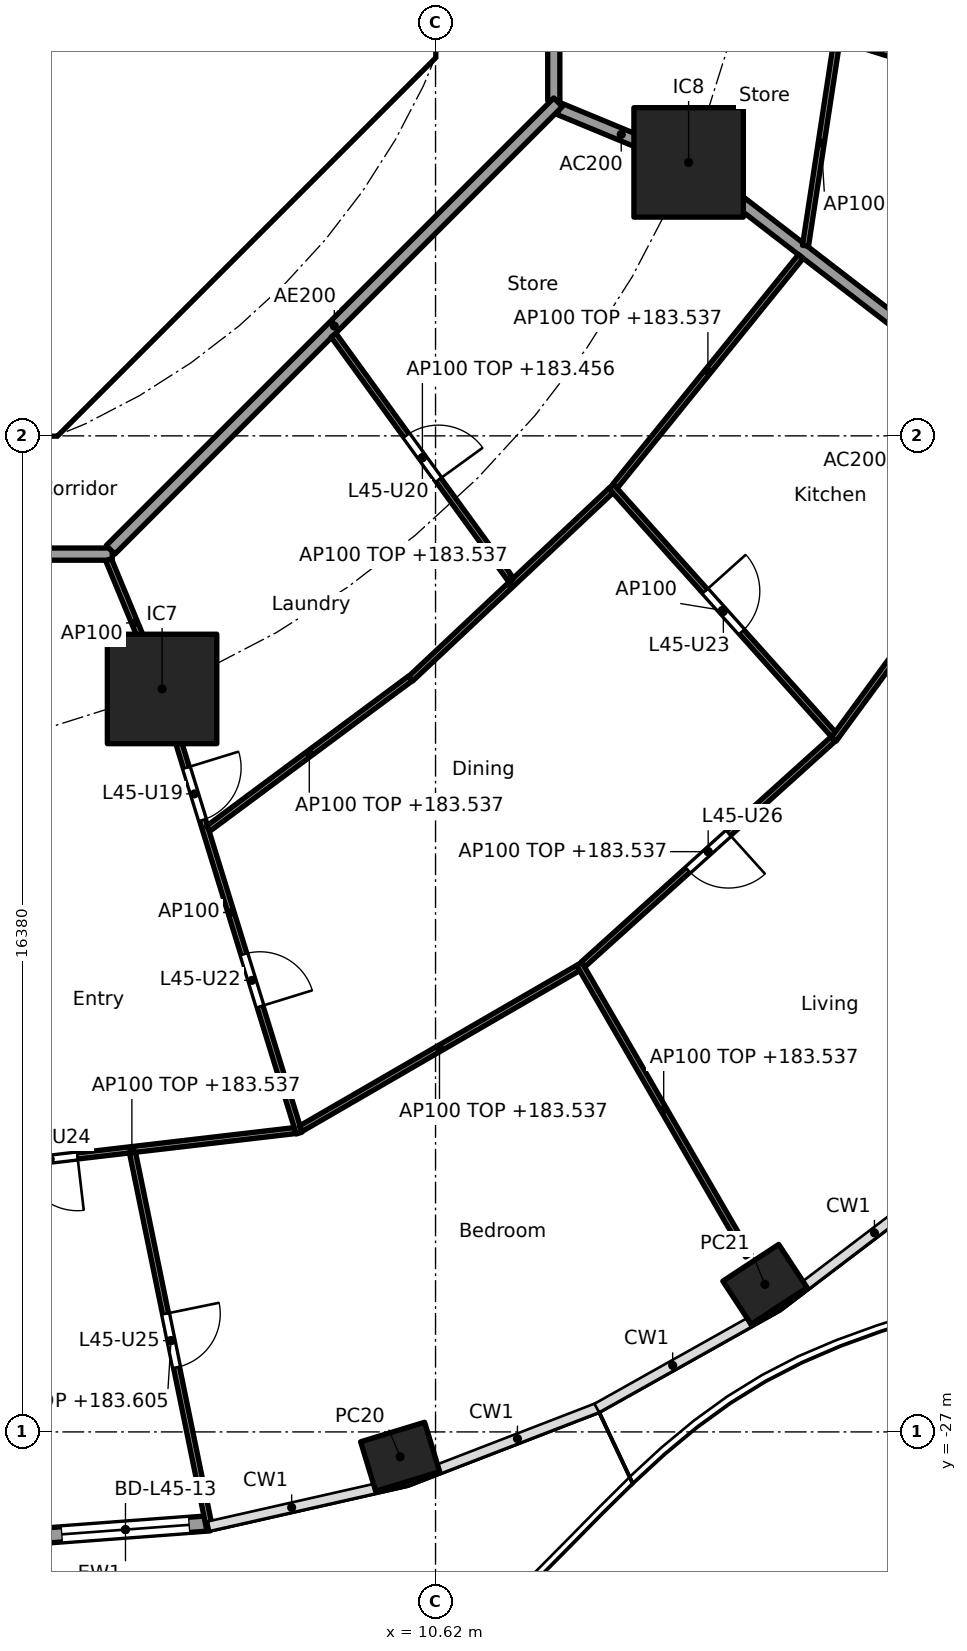
"""IFC4 building model, lengths in metres.
Left out: names, types, materials, properties, quantities, classifications, styles, units other than length and angle.
Written with IfcOpenShell. Run it as: python <this file> out.ifc"""

import sys

from ifc_helpers import new_model, si_unit, direction, frame, frame_2d, origin, origin_2d, place, context, subcontext, project, spatial, polyline, rectangle, hollow_rectangle, outline, extrude, element, fill, save


model = new_model("IFC4")
c1 = context("Model", 3, precision=1e-05, world=origin(), true_north=direction((0.0, 1.0)))
c2 = subcontext(c1, "Body", "Model", "MODEL_VIEW")
j1 = project(units=[si_unit("LENGTHUNIT", "METRE"), si_unit("PLANEANGLEUNIT", "RADIAN")], contexts=[c1])
p1 = place(None, origin())
s1 = spatial("IfcSite", under=j1, at=p1, CompositionType="ELEMENT")
p2 = place(p1, origin())
s2 = spatial("IfcBuilding", under=s1, at=p2, CompositionType="ELEMENT")
p3 = place(p2, frame((0.0, 0.0, 180.7)))
s3 = spatial("IfcBuildingStorey", under=s2, at=p3, CompositionType="ELEMENT", Elevation=180.7)
for number, where, z_axis, x_axis in (
    (1, (10.038, -27.408, 0.0), (0.0, 0.0, 1.0), (0.957, 0.292, 0.0)),
    (2, (16.038, -24.573, 0.0), (0.0, 0.0, 1.0), (0.836, 0.549, 0.0)),
):
    element("IfcColumn", number, at=place(p3, frame(where, z_axis=z_axis, x_axis=x_axis)), inside=s3, PredefinedType="COLUMN", context=c2, shape_type="SweptSolid", body=[
        extrude(hollow_rectangle(XDim=1.1, YDim=0.85, WallThickness=0.036, at=origin_2d()), origin(), (0.0, 0.0, 1.0), 3.7),
    ])
for number, where, z_axis, x_axis in (
    (3, (6.123, -14.782, 0.0), (0.0, 0.0, 1.0), (1.0, 0.0, 0.0)),
    (4, (14.782, -6.123, 0.0), (0.0, 0.0, 1.0), (1.0, 0.0, 0.0)),
):
    element("IfcColumn", number, at=place(p3, frame(where, z_axis=z_axis, x_axis=x_axis)), inside=s3, PredefinedType="COLUMN", context=c2, shape_type="SweptSolid", body=[
        extrude(rectangle(XDim=1.8, YDim=1.8, at=origin_2d()), origin(), (0.0, 0.0, 1.0), 3.7),
    ])
p4 = place(p3, frame((6.903, -28.503, 0.0), z_axis=(0.0, 0.0, 1.0), x_axis=(-0.997232064422, -0.074351931305, 0.0)))
e5 = element("IfcWall", 5, at=p4, inside=s3, PredefinedType="SOLIDWALL", context=c2, shape_type="SweptSolid", body=[
    extrude(rectangle(XDim=2.771, YDim=0.25, at=frame_2d((1.386, 0.0))), origin(), (0.0, 0.0, 1.0), 3.44),
])
p5 = place(p4, frame((0.336, 0.0, 0.0)))
e6 = element("IfcOpeningElement", 6, at=p5, cuts=e5, PredefinedType="OPENING", context=c2, shape_type="SweptSolid", body=[
    extrude(rectangle(XDim=2.1, YDim=2.4, at=frame_2d((1.05, 1.2))), frame((0.0, 0.135, 0.0), z_axis=(0.0, -1.0, 0.0), x_axis=(1.0, 0.0, 0.0)), (0.0, 0.0, 1.0), 0.27),
])
p6 = place(p3, frame((4.613, -9.988, 0.0), z_axis=(0.0, 0.0, 1.0), x_axis=(0.707106781187, 0.707106781187, 0.0)))
e7 = element("IfcWall", 7, at=p6, inside=s3, PredefinedType="SHEAR", context=c2, shape_type="SweptSolid", body=[
    extrude(rectangle(XDim=7.602, YDim=0.6, at=frame_2d((3.801, 0.0))), origin(), (0.0, 0.0, 1.0), 3.44),
])
p7 = place(p6, frame((3.201, 0.0, 0.0)))
e8 = element("IfcOpeningElement", 8, at=p7, cuts=e7, PredefinedType="OPENING", context=c2, shape_type="SweptSolid", body=[
    extrude(rectangle(XDim=1.2, YDim=2.1, at=frame_2d((0.6, 1.05))), frame((0.0, 0.31, 0.0), z_axis=(0.0, -1.0, 0.0), x_axis=(1.0, 0.0, 0.0)), (0.0, 0.0, 1.0), 0.62),
])
p8 = place(p3, origin())
e9 = element("IfcWall", 9, at=p8, inside=s3, PredefinedType="SHEAR", context=c2, shape_type="SweptSolid", body=[
    extrude(outline(polyline([(-4.152, -10.025), (4.152, -10.025), (4.401, -9.776), (4.825, -10.2), (4.401, -10.625), (-4.401, -10.625), (-4.825, -10.2), (-4.401, -9.776), (-4.152, -10.025)])), origin(), (0.0, 0.0, 1.0), 3.44),
])
p9 = place(p3, origin())
e10 = element("IfcWall", 10, at=p9, inside=s3, PredefinedType="SHEAR", context=c2, shape_type="SweptSolid", body=[
    extrude(outline(polyline([(9.776, -4.401), (10.025, -4.152), (10.025, -3.801), (10.025, 4.152), (9.776, 4.401), (10.2, 4.825), (10.625, 4.401), (10.625, -4.401), (10.2, -4.825), (9.776, -4.401)])), origin(), (0.0, 0.0, 1.0), 3.44),
])
p10 = place(p3, frame((12.657, -5.243, 0.0), z_axis=(0.0, 0.0, 1.0), x_axis=(0.92383017907, -0.382802560388, 0.0)))
e11 = element("IfcWall", 11, at=p10, inside=s3, PredefinedType="PARTITIONING", context=c2, shape_type="SweptSolid", body=[
    extrude(rectangle(XDim=2.2, YDim=0.2, at=frame_2d((1.1, 0.0))), origin(), (0.0, 0.0, 1.0), 3.44),
])
p11 = place(p3, frame((14.822, -6.154, 0.0), z_axis=(0.0, 0.0, 1.0), x_axis=(0.792203056092, -0.610257583254, 0.0)))
e12 = element("IfcWall", 12, at=p11, inside=s3, PredefinedType="PARTITIONING", context=c2, shape_type="SweptSolid", body=[
    extrude(rectangle(XDim=12.533, YDim=0.2, at=frame_2d((6.266, 0.0))), origin(), (0.0, 0.0, 1.0), 2.837),
])
p12 = place(p3, frame((12.565, -5.104, 0.0), z_axis=(0.0, 0.0, 1.0), x_axis=(0.0, 1.0, 0.0)))
e13 = element("IfcWall", 13, at=p12, inside=s3, PredefinedType="PARTITIONING", context=c2, shape_type="SweptSolid", body=[
    extrude(rectangle(XDim=10.209, YDim=0.2, at=frame_2d((5.104, 0.0))), origin(), (0.0, 0.0, 1.0), 3.44),
])
p13 = place(p12, frame((3.303, 0.0, 0.0)))
e14 = element("IfcOpeningElement", 14, at=p13, cuts=e13, PredefinedType="OPENING", context=c2, shape_type="SweptSolid", body=[
    extrude(rectangle(XDim=1.0, YDim=2.1, at=frame_2d((0.5, 1.05))), frame((0.0, 0.11, 0.0), z_axis=(0.0, -1.0, 0.0), x_axis=(1.0, 0.0, 0.0)), (0.0, 0.0, 1.0), 0.22),
])
p14 = place(p3, frame((-5.104, -12.565, 0.0), z_axis=(0.0, 0.0, 1.0), x_axis=(1.0, 0.0, 0.0)))
e15 = element("IfcWall", 15, at=p14, inside=s3, PredefinedType="PARTITIONING", context=c2, shape_type="SweptSolid", body=[
    extrude(rectangle(XDim=10.409, YDim=0.2, at=frame_2d((5.205, 0.0))), origin(), (0.0, 0.0, 1.0), 3.44),
])
p15 = place(p14, frame((8.074, 0.0, 0.0)))
e16 = element("IfcOpeningElement", 16, at=p15, cuts=e15, PredefinedType="OPENING", context=c2, shape_type="SweptSolid", body=[
    extrude(rectangle(XDim=1.0, YDim=2.1, at=frame_2d((0.5, 1.05))), frame((0.0, 0.11, 0.0), z_axis=(0.0, -1.0, 0.0), x_axis=(1.0, 0.0, 0.0)), (0.0, 0.0, 1.0), 0.22),
])
p16 = place(p3, frame((5.275, -12.494, 0.0), z_axis=(0.0, 0.0, 1.0), x_axis=(0.707106781187, 0.707106781187, 0.0)))
e17 = element("IfcWall", 17, at=p16, inside=s3, PredefinedType="PARTITIONING", context=c2, shape_type="SweptSolid", body=[
    extrude(rectangle(XDim=10.409, YDim=0.2, at=frame_2d((5.205, 0.0))), origin(), (0.0, 0.0, 1.0), 3.44),
])
p17 = place(p3, frame((2.941, -22.671, 0.0), z_axis=(0.0, 0.0, 1.0), x_axis=(0.993245806382, 0.1160291692, 0.0)))
e18 = element("IfcWall", 18, at=p17, inside=s3, PredefinedType="PARTITIONING", context=c2, shape_type="SweptSolid", body=[
    extrude(rectangle(XDim=5.408, YDim=0.1, at=frame_2d((2.704, 0.0))), origin(), (0.0, 0.0, 1.0), 2.837),
])
p18 = place(p17, frame((0.902, 0.0, 0.0)))
e19 = element("IfcOpeningElement", 19, at=p18, cuts=e18, PredefinedType="OPENING", context=c2, shape_type="SweptSolid", body=[
    extrude(rectangle(XDim=0.9, YDim=2.1, at=frame_2d((0.45, 1.05))), frame((0.0, 0.06, 0.0), z_axis=(0.0, -1.0, 0.0), x_axis=(1.0, 0.0, 0.0)), (0.0, 0.0, 1.0), 0.12),
])
p19 = place(p3, frame((5.636, -22.407, 0.0), z_axis=(0.0, 0.0, 1.0), x_axis=(0.200860375092, -0.979619880218, 0.0)))
e20 = element("IfcWall", 20, at=p19, inside=s3, PredefinedType="PARTITIONING", context=c2, shape_type="SweptSolid", body=[
    extrude(rectangle(XDim=6.311, YDim=0.1, at=frame_2d((3.155, 0.0))), origin(), (0.0, 0.0, 1.0), 2.905),
])
p20 = place(p19, frame((2.705, 0.0, 0.0)))
e21 = element("IfcOpeningElement", 21, at=p20, cuts=e20, PredefinedType="OPENING", context=c2, shape_type="SweptSolid", body=[
    extrude(rectangle(XDim=0.9, YDim=2.1, at=frame_2d((0.45, 1.05))), frame((0.0, 0.06, 0.0), z_axis=(0.0, -1.0, 0.0), x_axis=(1.0, 0.0, 0.0)), (0.0, 0.0, 1.0), 0.12),
])
p21 = place(p3, frame((5.243, -12.657, 0.0), z_axis=(0.0, 0.0, 1.0), x_axis=(0.382719158442, -0.923864733477, 0.0)))
e22 = element("IfcWall", 22, at=p21, inside=s3, PredefinedType="PARTITIONING", context=c2, shape_type="SweptSolid", body=[
    extrude(rectangle(XDim=2.25, YDim=0.1, at=frame_2d((1.125, 0.0))), origin(), (0.0, 0.0, 1.0), 3.44),
])
p22 = place(p3, frame((6.138, -14.83, 0.0), z_axis=(0.0, 0.0, 1.0), x_axis=(0.294822274121, -0.955552105687, 0.0)))
e23 = element("IfcWall", 23, at=p22, inside=s3, PredefinedType="PARTITIONING", context=c2, shape_type="SweptSolid", body=[
    extrude(rectangle(XDim=7.594, YDim=0.1, at=frame_2d((3.797, 0.0))), origin(), (0.0, 0.0, 1.0), 3.44),
])
p23 = place(p22, frame((1.306, 0.0, 0.0)))
e24 = element("IfcOpeningElement", 24, at=p23, cuts=e23, PredefinedType="OPENING", context=c2, shape_type="SweptSolid", body=[
    extrude(rectangle(XDim=0.9, YDim=2.1, at=frame_2d((0.45, 1.05))), frame((0.0, 0.06, 0.0), z_axis=(0.0, -1.0, 0.0), x_axis=(1.0, 0.0, 0.0)), (0.0, 0.0, 1.0), 0.12),
])
p24 = place(p22, frame((4.515, 0.0, 0.0)))
e25 = element("IfcOpeningElement", 25, at=p24, cuts=e23, PredefinedType="OPENING", context=c2, shape_type="SweptSolid", body=[
    extrude(rectangle(XDim=0.9, YDim=2.1, at=frame_2d((0.45, 1.05))), frame((0.0, 0.06, 0.0), z_axis=(0.0, -1.0, 0.0), x_axis=(1.0, 0.0, 0.0)), (0.0, 0.0, 1.0), 0.12),
])
p25 = place(p3, frame((6.881, -17.08, 0.0), z_axis=(0.0, 0.0, 1.0), x_axis=(0.802784956441, 0.596268659005, 0.0)))
e26 = element("IfcWall", 26, at=p25, inside=s3, PredefinedType="PARTITIONING", context=c2, shape_type="SweptSolid", body=[
    extrude(rectangle(XDim=4.142, YDim=0.1, at=frame_2d((2.071, 0.0))), origin(), (0.0, 0.0, 1.0), 2.837),
])
p26 = place(p3, frame((8.405, -22.013, 0.0), z_axis=(0.0, 0.0, 1.0), x_axis=(0.865277177388, 0.501293732547, 0.0)))
e27 = element("IfcWall", 27, at=p26, inside=s3, PredefinedType="PARTITIONING", context=c2, shape_type="SweptSolid", body=[
    extrude(rectangle(XDim=5.27, YDim=0.1, at=frame_2d((2.635, 0.0))), origin(), (0.0, 0.0, 1.0), 2.837),
])
p27 = place(p3, frame((10.21, -14.614, 0.0), z_axis=(0.0, 0.0, 1.0), x_axis=(0.728883199496, 0.684638066055, 0.0)))
e28 = element("IfcWall", 28, at=p27, inside=s3, PredefinedType="PARTITIONING", context=c2, shape_type="SweptSolid", body=[
    extrude(rectangle(XDim=4.519, YDim=0.1, at=frame_2d((2.26, 0.0))), origin(), (0.0, 0.0, 1.0), 2.837),
])
p28 = place(p3, frame((12.983, -19.303, 0.0), z_axis=(0.0, 0.0, 1.0), x_axis=(0.501315846071, -0.865264365659, 0.0)))
e29 = element("IfcWall", 29, at=p28, inside=s3, PredefinedType="PARTITIONING", context=c2, shape_type="SweptSolid", body=[
    extrude(rectangle(XDim=5.542, YDim=0.1, at=frame_2d((2.771, 0.0))), origin(), (0.0, 0.0, 1.0), 2.837),
])
p29 = place(p3, frame((13.045, -19.313, 0.0), z_axis=(0.0, 0.0, 1.0), x_axis=(0.742790086539, 0.66952437397, 0.0)))
e30 = element("IfcWall", 30, at=p29, inside=s3, PredefinedType="PARTITIONING", context=c2, shape_type="SweptSolid", body=[
    extrude(rectangle(XDim=5.542, YDim=0.1, at=frame_2d((2.771, 0.0))), origin(), (0.0, 0.0, 1.0), 2.837),
])
p30 = place(p29, frame((2.321, 0.0, 0.0)))
e31 = element("IfcOpeningElement", 31, at=p30, cuts=e30, PredefinedType="OPENING", context=c2, shape_type="SweptSolid", body=[
    extrude(rectangle(XDim=0.9, YDim=2.1, at=frame_2d((0.45, 1.05))), frame((0.0, 0.06, 0.0), z_axis=(0.0, -1.0, 0.0), x_axis=(1.0, 0.0, 0.0)), (0.0, 0.0, 1.0), 0.12),
])
p31 = place(p3, frame((8.943, -8.966, 0.0), z_axis=(0.0, 0.0, 1.0), x_axis=(0.587187896734, -0.809450661825, 0.0)))
e32 = element("IfcWall", 32, at=p31, inside=s3, PredefinedType="PARTITIONING", context=c2, shape_type="SweptSolid", body=[
    extrude(rectangle(XDim=4.975, YDim=0.1, at=frame_2d((2.487, 0.0))), origin(), (0.0, 0.0, 1.0), 2.756),
])
p32 = place(p31, frame((2.037, 0.0, 0.0)))
e33 = element("IfcOpeningElement", 33, at=p32, cuts=e32, PredefinedType="OPENING", context=c2, shape_type="SweptSolid", body=[
    extrude(rectangle(XDim=0.9, YDim=2.1, at=frame_2d((0.45, 1.05))), frame((0.0, 0.06, 0.0), z_axis=(0.0, -1.0, 0.0), x_axis=(1.0, 0.0, 0.0)), (0.0, 0.0, 1.0), 0.12),
])
p33 = place(p3, frame((13.507, -11.449, 0.0), z_axis=(0.0, 0.0, 1.0), x_axis=(0.667299792168, -0.744789223453, 0.0)))
e34 = element("IfcWall", 34, at=p33, inside=s3, PredefinedType="PARTITIONING", context=c2, shape_type="SweptSolid", body=[
    extrude(rectangle(XDim=5.482, YDim=0.1, at=frame_2d((2.741, 0.0))), origin(), (0.0, 0.0, 1.0), 3.44),
])
p34 = place(p33, frame((2.316, 0.0, 0.0)))
e35 = element("IfcOpeningElement", 35, at=p34, cuts=e34, PredefinedType="OPENING", context=c2, shape_type="SweptSolid", body=[
    extrude(rectangle(XDim=0.9, YDim=2.1, at=frame_2d((0.45, 1.05))), frame((0.0, 0.06, 0.0), z_axis=(0.0, -1.0, 0.0), x_axis=(1.0, 0.0, 0.0)), (0.0, 0.0, 1.0), 0.12),
])
p35 = place(p3, frame((13.572, -11.447, 0.0), z_axis=(0.0, 0.0, 1.0), x_axis=(0.628738316533, 0.777616955399, 0.0)))
e36 = element("IfcWall", 36, at=p35, inside=s3, PredefinedType="PARTITIONING", context=c2, shape_type="SweptSolid", body=[
    extrude(rectangle(XDim=4.857, YDim=0.1, at=frame_2d((2.429, 0.0))), origin(), (0.0, 0.0, 1.0), 2.837),
])
p36 = place(p3, frame((17.169, -15.609, 0.0), z_axis=(0.0, 0.0, 1.0), x_axis=(0.591122127251, 0.806582066918, 0.0)))
e37 = element("IfcWall", 37, at=p36, inside=s3, PredefinedType="PARTITIONING", context=c2, shape_type="SweptSolid", body=[
    extrude(rectangle(XDim=5.96, YDim=0.1, at=frame_2d((2.98, 0.0))), origin(), (0.0, 0.0, 1.0), 2.837),
])
p37 = place(p3, frame((16.704, -7.493, 0.0), z_axis=(0.0, 0.0, 1.0), x_axis=(0.1510806336, 0.988521442434, 0.0)))
e38 = element("IfcWall", 38, at=p37, inside=s3, PredefinedType="PARTITIONING", context=c2, shape_type="SweptSolid", body=[
    extrude(rectangle(XDim=3.419, YDim=0.1, at=frame_2d((1.71, 0.0))), origin(), (0.0, 0.0, 1.0), 2.837),
])
p38 = place(p3, frame((12.66, -2.632, 0.0), z_axis=(0.0, 0.0, 1.0), x_axis=(0.954248738607, -0.299013954302, 0.0)))
e39 = element("IfcWall", 39, at=p38, inside=s3, PredefinedType="PARTITIONING", context=c2, shape_type="SweptSolid", body=[
    extrude(rectangle(XDim=15.142, YDim=0.1, at=frame_2d((7.571, 0.0))), origin(), (0.0, 0.0, 1.0), 2.756),
])
p39 = place(p38, frame((0.669, 0.0, 0.0)))
e40 = element("IfcOpeningElement", 40, at=p39, cuts=e39, PredefinedType="OPENING", context=c2, shape_type="SweptSolid", body=[
    extrude(rectangle(XDim=0.9, YDim=2.1, at=frame_2d((0.45, 1.05))), frame((0.0, 0.06, 0.0), z_axis=(0.0, -1.0, 0.0), x_axis=(1.0, 0.0, 0.0)), (0.0, 0.0, 1.0), 0.12),
])
p40 = place(p38, frame((6.944, 0.0, 0.0)))
e41 = element("IfcOpeningElement", 41, at=p40, cuts=e39, PredefinedType="OPENING", context=c2, shape_type="SweptSolid", body=[
    extrude(rectangle(XDim=0.9, YDim=2.1, at=frame_2d((0.45, 1.05))), frame((0.0, 0.06, 0.0), z_axis=(0.0, -1.0, 0.0), x_axis=(1.0, 0.0, 0.0)), (0.0, 0.0, 1.0), 0.12),
])
p41 = place(p5, origin())
e42 = element("IfcDoor", 42, at=p41, inside=s3, OperationType="SLIDING_TO_LEFT", PredefinedType="DOOR", context=c2, shape_type="SweptSolid", body=[
    extrude(rectangle(XDim=2.1, YDim=2.4, at=frame_2d((1.05, 1.2))), frame((0.0, 0.025, 0.0), z_axis=(0.0, -1.0, 0.0), x_axis=(1.0, 0.0, 0.0)), (0.0, 0.0, 1.0), 0.05),
])
fill(e6, e42)
p42 = place(p7, origin())
e43 = element("IfcDoor", 43, at=p42, inside=s3, OperationType="SINGLE_SWING_LEFT", PredefinedType="DOOR", context=c2, shape_type="SweptSolid", body=[
    extrude(rectangle(XDim=1.2, YDim=2.1, at=frame_2d((0.6, 1.05))), frame((0.0, 0.025, 0.0), z_axis=(0.0, -1.0, 0.0), x_axis=(1.0, 0.0, 0.0)), (0.0, 0.0, 1.0), 0.05),
])
fill(e8, e43)
p43 = place(p23, origin())
e44 = element("IfcDoor", 44, at=p43, inside=s3, OperationType="SINGLE_SWING_LEFT", PredefinedType="DOOR", context=c2, shape_type="SweptSolid", body=[
    extrude(rectangle(XDim=0.9, YDim=2.1, at=frame_2d((0.45, 1.05))), frame((0.0, 0.025, 0.0), z_axis=(0.0, -1.0, 0.0), x_axis=(1.0, 0.0, 0.0)), (0.0, 0.0, 1.0), 0.05),
])
fill(e24, e44)
p44 = place(p32, origin())
e45 = element("IfcDoor", 45, at=p44, inside=s3, OperationType="SINGLE_SWING_RIGHT", PredefinedType="DOOR", context=c2, shape_type="SweptSolid", body=[
    extrude(rectangle(XDim=0.9, YDim=2.1, at=frame_2d((0.45, 1.05))), frame((0.0, 0.025, 0.0), z_axis=(0.0, -1.0, 0.0), x_axis=(1.0, 0.0, 0.0)), (0.0, 0.0, 1.0), 0.05),
])
fill(e33, e45)
p45 = place(p24, origin())
e46 = element("IfcDoor", 46, at=p45, inside=s3, OperationType="SINGLE_SWING_RIGHT", PredefinedType="DOOR", context=c2, shape_type="SweptSolid", body=[
    extrude(rectangle(XDim=0.9, YDim=2.1, at=frame_2d((0.45, 1.05))), frame((0.0, 0.025, 0.0), z_axis=(0.0, -1.0, 0.0), x_axis=(1.0, 0.0, 0.0)), (0.0, 0.0, 1.0), 0.05),
])
fill(e25, e46)
p46 = place(p34, origin())
e47 = element("IfcDoor", 47, at=p46, inside=s3, OperationType="SINGLE_SWING_LEFT", PredefinedType="DOOR", context=c2, shape_type="SweptSolid", body=[
    extrude(rectangle(XDim=0.9, YDim=2.1, at=frame_2d((0.45, 1.05))), frame((0.0, 0.025, 0.0), z_axis=(0.0, -1.0, 0.0), x_axis=(1.0, 0.0, 0.0)), (0.0, 0.0, 1.0), 0.05),
])
fill(e35, e47)
p47 = place(p18, frame((0.9, 0.0, 0.0), x_axis=(-1.0, 0.0, 0.0)))
e48 = element("IfcDoor", 48, at=p47, inside=s3, OperationType="SINGLE_SWING_LEFT", PredefinedType="DOOR", context=c2, shape_type="SweptSolid", body=[
    extrude(rectangle(XDim=0.9, YDim=2.1, at=frame_2d((0.45, 1.05))), frame((0.0, 0.025, 0.0), z_axis=(0.0, -1.0, 0.0), x_axis=(1.0, 0.0, 0.0)), (0.0, 0.0, 1.0), 0.05),
])
fill(e19, e48)
p48 = place(p20, origin())
e49 = element("IfcDoor", 49, at=p48, inside=s3, OperationType="SINGLE_SWING_LEFT", PredefinedType="DOOR", context=c2, shape_type="SweptSolid", body=[
    extrude(rectangle(XDim=0.9, YDim=2.1, at=frame_2d((0.45, 1.05))), frame((0.0, 0.025, 0.0), z_axis=(0.0, -1.0, 0.0), x_axis=(1.0, 0.0, 0.0)), (0.0, 0.0, 1.0), 0.05),
])
fill(e21, e49)
p49 = place(p30, frame((0.9, 0.0, 0.0), x_axis=(-1.0, 0.0, 0.0)))
e50 = element("IfcDoor", 50, at=p49, inside=s3, OperationType="SINGLE_SWING_LEFT", PredefinedType="DOOR", context=c2, shape_type="SweptSolid", body=[
    extrude(rectangle(XDim=0.9, YDim=2.1, at=frame_2d((0.45, 1.05))), frame((0.0, 0.025, 0.0), z_axis=(0.0, -1.0, 0.0), x_axis=(1.0, 0.0, 0.0)), (0.0, 0.0, 1.0), 0.05),
])
fill(e31, e50)
save(model, sys.argv[1])
